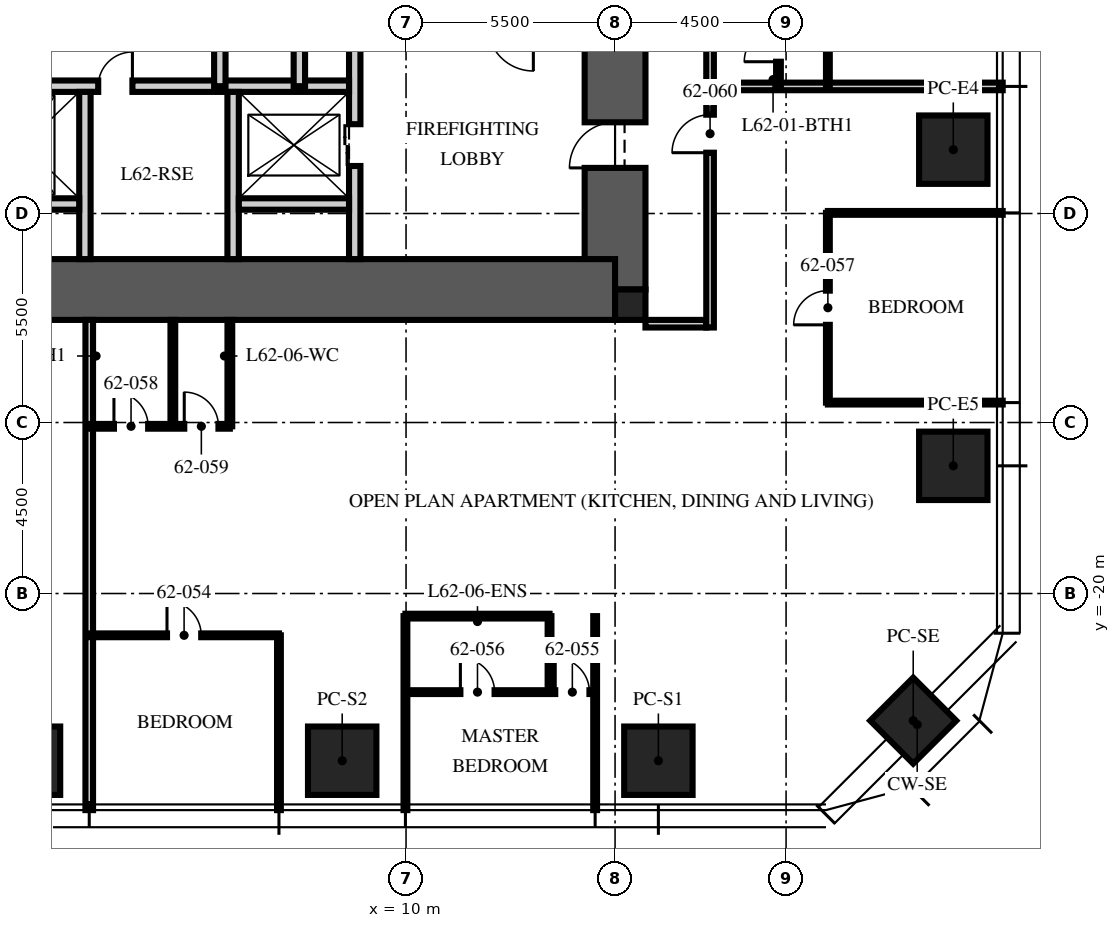
"""IFC4 building model, lengths in metres.
Left out: names, types, materials, properties, quantities, classifications, styles, units other than length and angle.
Written with IfcOpenShell. Run it as: python <this file> out.ifc"""

import sys

from ifc_helpers import new_model, si_unit, direction, frame, frame_2d, origin, origin_2d, place, context, subcontext, project, spatial, rectangle, extrude, element, fill, save


model = new_model("IFC4")
c1 = context("Model", 3, precision=1e-05, world=origin(), true_north=direction((0.0, 1.0)))
c2 = subcontext(c1, "Body", "Model", "MODEL_VIEW")
j1 = project(units=[si_unit("LENGTHUNIT", "METRE"), si_unit("PLANEANGLEUNIT", "RADIAN")], contexts=[c1])
p1 = place(None, origin())
s1 = spatial("IfcSite", under=j1, at=p1, CompositionType="ELEMENT")
p2 = place(p1, origin())
s2 = spatial("IfcBuilding", under=s1, at=p2, CompositionType="ELEMENT")
p3 = place(p2, frame((0.0, 0.0, 248.25)))
s3 = spatial("IfcBuildingStorey", under=s2, at=p3, CompositionType="ELEMENT", Elevation=248.25)
p4 = place(p3, frame((15.5, -12.0, -0.25), z_axis=(0.0, 0.0, 1.0), x_axis=(0.0, 1.0, 0.0)))
e1 = element("IfcWall", 1, at=p4, inside=s3, PredefinedType="SHEAR", context=c2, shape_type="SweptSolid", body=[
    extrude(rectangle(XDim=24.0, YDim=1.6, at=frame_2d((12.0, 0.0))), origin(), (0.0, 0.0, 1.0), 3.75),
])
p5 = place(p4, frame((3.2, 0.0, 0.25)))
e2 = element("IfcOpeningElement", 2, at=p5, cuts=e1, PredefinedType="OPENING", context=c2, shape_type="SweptSolid", body=[
    extrude(rectangle(XDim=1.2, YDim=2.1, at=frame_2d((0.6, 1.05))), frame((0.0, 0.81, 0.0), z_axis=(0.0, -1.0, 0.0), x_axis=(1.0, 0.0, 0.0)), (0.0, 0.0, 1.0), 1.62),
])
p6 = place(p4, frame((19.3, 0.0, 0.25)))
e3 = element("IfcOpeningElement", 3, at=p6, cuts=e1, PredefinedType="OPENING", context=c2, shape_type="SweptSolid", body=[
    extrude(rectangle(XDim=1.8, YDim=2.1, at=frame_2d((0.9, 1.05))), frame((0.0, 0.81, 0.0), z_axis=(0.0, -1.0, 0.0), x_axis=(1.0, 0.0, 0.0)), (0.0, 0.0, 1.0), 1.62),
])
p7 = place(p3, frame((-15.5, -12.0, -0.25), z_axis=(0.0, 0.0, 1.0), x_axis=(1.0, 0.0, 0.0)))
e4 = element("IfcWall", 4, at=p7, inside=s3, PredefinedType="SHEAR", context=c2, shape_type="SweptSolid", body=[
    extrude(rectangle(XDim=31.0, YDim=1.6, at=frame_2d((15.5, 0.0))), origin(), (0.0, 0.0, 1.0), 3.75),
])
p8 = place(p3, frame((15.9, -12.4, -0.25), z_axis=(0.0, 0.0, 1.0), x_axis=(1.0, 0.0, 0.0)))
e5 = element("IfcColumn", 5, at=p8, inside=s3, PredefinedType="COLUMN", context=c2, shape_type="SweptSolid", body=[
    extrude(rectangle(XDim=0.8, YDim=0.8, at=origin_2d()), origin(), (0.0, 0.0, 1.0), 3.75),
])
for number, where, z_axis, x_axis in (
    (6, (24.4, -8.32, 0.0), (0.0, 0.0, 1.0), (0.0, 1.0, 0.0)),
    (7, (24.4, -16.64, 0.0), (0.0, 0.0, 1.0), (0.0, 1.0, 0.0)),
    (8, (16.64, -24.4, 0.0), (0.0, 0.0, 1.0), (1.0, 0.0, 0.0)),
    (9, (8.32, -24.4, 0.0), (0.0, 0.0, 1.0), (1.0, 0.0, 0.0)),
    (10, (0.0, -24.4, 0.0), (0.0, 0.0, 1.0), (1.0, 0.0, 0.0)),
):
    element("IfcColumn", number, at=place(p3, frame(where, z_axis=z_axis, x_axis=x_axis)), inside=s3, PredefinedType="COLUMN", context=c2, shape_type="SweptSolid", body=[
        extrude(rectangle(XDim=1.8, YDim=1.8, at=origin_2d()), origin(), (0.0, 0.0, 1.0), 3.75),
    ])
p9 = place(p3, frame((23.346, -23.346, 0.0), z_axis=(0.0, 0.0, 1.0), x_axis=(0.707106781187, 0.707106781187, 0.0)))
e11 = element("IfcColumn", 11, at=p9, inside=s3, PredefinedType="COLUMN", context=c2, shape_type="SweptSolid", body=[
    extrude(rectangle(XDim=1.6, YDim=1.6, at=origin_2d()), origin(), (0.0, 0.0, 1.0), 3.75),
])
p10 = place(p3, frame((8.65, -11.2, 0.0), z_axis=(0.0, 0.0, 1.0), x_axis=(0.0, 1.0, 0.0)))
e12 = element("IfcWall", 12, at=p10, inside=s3, PredefinedType="PARTITIONING", context=c2, shape_type="SweptSolid", body=[
    extrude(rectangle(XDim=6.3, YDim=0.3, at=frame_2d((3.15, 0.0))), origin(), (0.0, 0.0, 1.0), 3.5),
])
p11 = place(p10, frame((2.45, 0.0, 0.0)))
e13 = element("IfcOpeningElement", 13, at=p11, cuts=e12, PredefinedType="OPENING", context=c2, shape_type="SweptSolid", body=[
    extrude(rectangle(XDim=1.1, YDim=2.1, at=frame_2d((0.55, 1.05))), frame((0.0, 0.16, 0.0), z_axis=(0.0, -1.0, 0.0), x_axis=(1.0, 0.0, 0.0)), (0.0, 0.0, 1.0), 0.32),
])
p12 = place(p3, frame((-8.5, -6.65, 0.0), z_axis=(0.0, 0.0, 1.0), x_axis=(1.0, 0.0, 0.0)))
e14 = element("IfcWall", 14, at=p12, inside=s3, PredefinedType="PARTITIONING", context=c2, shape_type="SweptSolid", body=[
    extrude(rectangle(XDim=17.0, YDim=0.3, at=frame_2d((8.5, 0.0))), origin(), (0.0, 0.0, 1.0), 3.5),
])
p13 = place(p12, frame((7.8, 0.0, 0.0)))
e15 = element("IfcOpeningElement", 15, at=p13, cuts=e14, PredefinedType="OPENING", context=c2, shape_type="SweptSolid", body=[
    extrude(rectangle(XDim=1.3, YDim=2.4, at=frame_2d((0.65, 1.2))), frame((0.0, 0.16, 0.0), z_axis=(0.0, -1.0, 0.0), x_axis=(1.0, 0.0, 0.0)), (0.0, 0.0, 1.0), 0.32),
])
p14 = place(p12, frame((5.65, 0.0, 0.0)))
e16 = element("IfcOpeningElement", 16, at=p14, cuts=e14, PredefinedType="OPENING", context=c2, shape_type="SweptSolid", body=[
    extrude(rectangle(XDim=0.9, YDim=2.1, at=frame_2d((0.45, 1.05))), frame((0.0, 0.16, 0.0), z_axis=(0.0, -1.0, 0.0), x_axis=(1.0, 0.0, 0.0)), (0.0, 0.0, 1.0), 0.32),
])
p15 = place(p12, frame((10.4, 0.0, 0.0)))
e17 = element("IfcOpeningElement", 17, at=p15, cuts=e14, PredefinedType="OPENING", context=c2, shape_type="SweptSolid", body=[
    extrude(rectangle(XDim=0.9, YDim=2.1, at=frame_2d((0.45, 1.05))), frame((0.0, 0.16, 0.0), z_axis=(0.0, -1.0, 0.0), x_axis=(1.0, 0.0, 0.0)), (0.0, 0.0, 1.0), 0.32),
])
for number, where, z_axis, x_axis in (
    (18, (1.55, -11.2, 0.0), (0.0, 0.0, 1.0), (0.0, 1.0, 0.0)),
    (19, (5.45, -11.2, 0.0), (0.0, 0.0, 1.0), (0.0, 1.0, 0.0)),
):
    element("IfcWall", number, at=place(p3, frame(where, z_axis=z_axis, x_axis=x_axis)), inside=s3, PredefinedType="PARTITIONING", context=c2, shape_type="SweptSolid", body=[
        extrude(rectangle(XDim=4.4, YDim=0.3, at=frame_2d((2.2, 0.0))), origin(), (0.0, 0.0, 1.0), 3.5),
    ])
for number, where, z_axis, x_axis in (
    (20, (-1.5, -9.75, 0.0), (0.0, 0.0, 1.0), (1.0, 0.0, 0.0)),
    (21, (5.6, -9.75, 0.0), (0.0, 0.0, 1.0), (1.0, 0.0, 0.0)),
):
    element("IfcWall", number, at=place(p3, frame(where, z_axis=z_axis, x_axis=x_axis)), inside=s3, PredefinedType="PARTITIONING", context=c2, shape_type="SweptSolid", body=[
        extrude(rectangle(XDim=2.9, YDim=0.3, at=frame_2d((1.45, 0.0))), origin(), (0.0, 0.0, 1.0), 3.5),
    ])
p16 = place(p3, frame((5.1, -6.65, 0.0), z_axis=(0.0, 0.0, 1.0), x_axis=(0.0, 1.0, 0.0)))
e22 = element("IfcWall", 22, at=p16, inside=s3, PredefinedType="PARTITIONING", context=c2, shape_type="SweptSolid", body=[
    extrude(rectangle(XDim=9.45, YDim=0.3, at=frame_2d((4.725, 0.0))), origin(), (0.0, 0.0, 1.0), 3.5),
])
p17 = place(p16, frame((4.275, 0.0, 0.0)))
e23 = element("IfcOpeningElement", 23, at=p17, cuts=e22, PredefinedType="OPENING", context=c2, shape_type="SweptSolid", body=[
    extrude(rectangle(XDim=0.9, YDim=2.1, at=frame_2d((0.45, 1.05))), frame((0.0, 0.16, 0.0), z_axis=(0.0, -1.0, 0.0), x_axis=(1.0, 0.0, 0.0)), (0.0, 0.0, 1.0), 0.32),
])
p18 = place(p3, frame((7.193, -6.65, 0.0), z_axis=(0.0, 0.0, 1.0), x_axis=(0.0, 1.0, 0.0)))
e24 = element("IfcWall", 24, at=p18, inside=s3, PredefinedType="PARTITIONING", context=c2, shape_type="SweptSolid", body=[
    extrude(rectangle(XDim=9.45, YDim=0.3, at=frame_2d((4.725, 0.0))), origin(), (0.0, 0.0, 1.0), 3.5),
])
p19 = place(p3, frame((16.3, -12.9, 0.0), z_axis=(0.0, 0.0, 1.0), x_axis=(1.0, 0.0, 0.0)))
e25 = element("IfcWall", 25, at=p19, inside=s3, PredefinedType="PARTITIONING", context=c2, shape_type="SweptSolid", body=[
    extrude(rectangle(XDim=1.6, YDim=0.2, at=frame_2d((0.8, 0.0))), origin(), (0.0, 0.0, 1.0), 2.3),
])
p20 = place(p3, frame((18.1, -6.656, 0.0), z_axis=(0.0, 0.0, 1.0), x_axis=(1.0, 0.0, 0.0)))
e26 = element("IfcWall", 26, at=p20, inside=s3, PredefinedType="PARTITIONING", context=c2, shape_type="SweptSolid", body=[
    extrude(rectangle(XDim=7.6, YDim=0.2, at=frame_2d((3.8, 0.0))), origin(), (0.0, 0.0, 1.0), 2.91),
])
p21 = place(p3, frame((1.664, -12.8, 0.0), z_axis=(0.0, 0.0, 1.0), x_axis=(0.0, -1.0, 0.0)))
e27 = element("IfcWall", 27, at=p21, inside=s3, PredefinedType="PARTITIONING", context=c2, shape_type="SweptSolid", body=[
    extrude(rectangle(XDim=12.9, YDim=0.2, at=frame_2d((6.45, 0.0))), origin(), (0.0, 0.0, 1.0), 2.91),
])
p22 = place(p3, frame((6.656, -21.1, 0.0), z_axis=(0.0, 0.0, 1.0), x_axis=(0.0, -1.0, 0.0)))
e28 = element("IfcWall", 28, at=p22, inside=s3, PredefinedType="PARTITIONING", context=c2, shape_type="SweptSolid", body=[
    extrude(rectangle(XDim=4.6, YDim=0.1, at=frame_2d((2.3, 0.0))), origin(), (0.0, 0.0, 1.0), 2.91),
])
for number, where, z_axis, x_axis in (
    (29, (9.984, -20.595, 0.0), (0.0, 0.0, 1.0), (0.0, -1.0, 0.0)),
    (30, (14.976, -20.595, 0.0), (0.0, 0.0, 1.0), (0.0, -1.0, 0.0)),
):
    element("IfcWall", number, at=place(p3, frame(where, z_axis=z_axis, x_axis=x_axis)), inside=s3, PredefinedType="PARTITIONING", context=c2, shape_type="SweptSolid", body=[
        extrude(rectangle(XDim=5.105, YDim=0.1, at=frame_2d((2.552, 0.0))), origin(), (0.0, 0.0, 1.0), 2.91),
    ])
for number, where, z_axis, x_axis in (
    (31, (21.1, -14.976, 0.0), (0.0, 0.0, 1.0), (1.0, 0.0, 0.0)),
    (32, (21.1, -9.984, 0.0), (0.0, 0.0, 1.0), (1.0, 0.0, 0.0)),
):
    element("IfcWall", number, at=place(p3, frame(where, z_axis=z_axis, x_axis=x_axis)), inside=s3, PredefinedType="PARTITIONING", context=c2, shape_type="SweptSolid", body=[
        extrude(rectangle(XDim=4.6, YDim=0.1, at=frame_2d((2.3, 0.0))), origin(), (0.0, 0.0, 1.0), 2.91),
    ])
p23 = place(p3, frame((21.1, -6.656, 0.0), z_axis=(0.0, 0.0, 1.0), x_axis=(0.0, 1.0, 0.0)))
e33 = element("IfcWall", 33, at=p23, inside=s3, PredefinedType="PARTITIONING", context=c2, shape_type="SweptSolid", body=[
    extrude(rectangle(XDim=4.992, YDim=0.1, at=frame_2d((2.496, 0.0))), origin(), (0.0, 0.0, 1.0), 2.81),
])
p24 = place(p23, frame((2.046, 0.0, 0.0)))
e34 = element("IfcOpeningElement", 34, at=p24, cuts=e33, PredefinedType="OPENING", context=c2, shape_type="SweptSolid", body=[
    extrude(rectangle(XDim=0.9, YDim=2.1, at=frame_2d((0.45, 1.05))), frame((0.0, 0.06, 0.0), z_axis=(0.0, -1.0, 0.0), x_axis=(1.0, 0.0, 0.0)), (0.0, 0.0, 1.0), 0.12),
])
p25 = place(p3, frame((19.8, -6.656, 0.0), z_axis=(0.0, 0.0, 1.0), x_axis=(0.0, 1.0, 0.0)))
e35 = element("IfcWall", 35, at=p25, inside=s3, PredefinedType="PARTITIONING", context=c2, shape_type="SweptSolid", body=[
    extrude(rectangle(XDim=2.2, YDim=0.125, at=frame_2d((1.1, 0.0))), origin(), (0.0, 0.0, 1.0), 3.5),
])
p26 = place(p25, frame((0.65, 0.0, 0.0)))
e36 = element("IfcOpeningElement", 36, at=p26, cuts=e35, PredefinedType="OPENING", context=c2, shape_type="SweptSolid", body=[
    extrude(rectangle(XDim=0.9, YDim=2.1, at=frame_2d((0.45, 1.05))), frame((0.0, 0.073, 0.0), z_axis=(0.0, -1.0, 0.0), x_axis=(1.0, 0.0, 0.0)), (0.0, 0.0, 1.0), 0.145),
])
p27 = place(p3, frame((1.664, -21.1, 0.0), z_axis=(0.0, 0.0, 1.0), x_axis=(1.0, 0.0, 0.0)))
e37 = element("IfcWall", 37, at=p27, inside=s3, PredefinedType="PARTITIONING", context=c2, shape_type="SweptSolid", body=[
    extrude(rectangle(XDim=4.992, YDim=0.1, at=frame_2d((2.496, 0.0))), origin(), (0.0, 0.0, 1.0), 2.81),
])
p28 = place(p27, frame((2.046, 0.0, 0.0)))
e38 = element("IfcOpeningElement", 38, at=p28, cuts=e37, PredefinedType="OPENING", context=c2, shape_type="SweptSolid", body=[
    extrude(rectangle(XDim=0.9, YDim=2.1, at=frame_2d((0.45, 1.05))), frame((0.0, 0.06, 0.0), z_axis=(0.0, -1.0, 0.0), x_axis=(1.0, 0.0, 0.0)), (0.0, 0.0, 1.0), 0.12),
])
p29 = place(p3, frame((9.984, -22.595, 0.0), z_axis=(0.0, 0.0, 1.0), x_axis=(1.0, 0.0, 0.0)))
e39 = element("IfcWall", 39, at=p29, inside=s3, PredefinedType="PARTITIONING", context=c2, shape_type="SweptSolid", body=[
    extrude(rectangle(XDim=4.992, YDim=0.1, at=frame_2d((2.496, 0.0))), origin(), (0.0, 0.0, 1.0), 2.81),
])
p30 = place(p29, frame((3.942, 0.0, 0.0)))
e40 = element("IfcOpeningElement", 40, at=p30, cuts=e39, PredefinedType="OPENING", context=c2, shape_type="SweptSolid", body=[
    extrude(rectangle(XDim=0.9, YDim=2.1, at=frame_2d((0.45, 1.05))), frame((0.0, 0.06, 0.0), z_axis=(0.0, -1.0, 0.0), x_axis=(1.0, 0.0, 0.0)), (0.0, 0.0, 1.0), 0.12),
])
p31 = place(p29, frame((1.446, 0.0, 0.0)))
e41 = element("IfcOpeningElement", 41, at=p31, cuts=e39, PredefinedType="OPENING", context=c2, shape_type="SweptSolid", body=[
    extrude(rectangle(XDim=0.9, YDim=2.1, at=frame_2d((0.45, 1.05))), frame((0.0, 0.06, 0.0), z_axis=(0.0, -1.0, 0.0), x_axis=(1.0, 0.0, 0.0)), (0.0, 0.0, 1.0), 0.12),
])
p32 = place(p3, frame((13.776, -20.595, 0.0), z_axis=(0.0, 0.0, 1.0), x_axis=(0.0, -1.0, 0.0)))
e42 = element("IfcWall", 42, at=p32, inside=s3, PredefinedType="PARTITIONING", context=c2, shape_type="SweptSolid", body=[
    extrude(rectangle(XDim=2.0, YDim=0.1, at=frame_2d((1.0, 0.0))), origin(), (0.0, 0.0, 1.0), 3.5),
])
p33 = place(p3, frame((9.984, -20.595, 0.0), z_axis=(0.0, 0.0, 1.0), x_axis=(1.0, 0.0, 0.0)))
e43 = element("IfcWall", 43, at=p33, inside=s3, PredefinedType="PARTITIONING", context=c2, shape_type="SweptSolid", body=[
    extrude(rectangle(XDim=3.792, YDim=0.125, at=frame_2d((1.896, 0.0))), origin(), (0.0, 0.0, 1.0), 2.81),
])
p34 = place(p3, frame((21.1, -14.976, 0.0), z_axis=(0.0, 0.0, 1.0), x_axis=(0.0, 1.0, 0.0)))
e44 = element("IfcWall", 44, at=p34, inside=s3, PredefinedType="PARTITIONING", context=c2, shape_type="SweptSolid", body=[
    extrude(rectangle(XDim=4.992, YDim=0.1, at=frame_2d((2.496, 0.0))), origin(), (0.0, 0.0, 1.0), 2.81),
])
p35 = place(p34, frame((2.046, 0.0, 0.0)))
e45 = element("IfcOpeningElement", 45, at=p35, cuts=e44, PredefinedType="OPENING", context=c2, shape_type="SweptSolid", body=[
    extrude(rectangle(XDim=0.9, YDim=2.1, at=frame_2d((0.45, 1.05))), frame((0.0, 0.06, 0.0), z_axis=(0.0, -1.0, 0.0), x_axis=(1.0, 0.0, 0.0)), (0.0, 0.0, 1.0), 0.12),
])
p36 = place(p3, frame((1.664, -15.6, 0.0), z_axis=(0.0, 0.0, 1.0), x_axis=(1.0, 0.0, 0.0)))
e46 = element("IfcWall", 46, at=p36, inside=s3, PredefinedType="PARTITIONING", context=c2, shape_type="SweptSolid", body=[
    extrude(rectangle(XDim=3.7, YDim=0.125, at=frame_2d((1.85, 0.0))), origin(), (0.0, 0.0, 1.0), 2.81),
])
p37 = place(p36, frame((0.65, 0.0, 0.0)))
e47 = element("IfcOpeningElement", 47, at=p37, cuts=e46, PredefinedType="OPENING", context=c2, shape_type="SweptSolid", body=[
    extrude(rectangle(XDim=0.9, YDim=2.1, at=frame_2d((0.45, 1.05))), frame((0.0, 0.073, 0.0), z_axis=(0.0, -1.0, 0.0), x_axis=(1.0, 0.0, 0.0)), (0.0, 0.0, 1.0), 0.145),
])
p38 = place(p36, frame((2.5, 0.0, 0.0)))
e48 = element("IfcOpeningElement", 48, at=p38, cuts=e46, PredefinedType="OPENING", context=c2, shape_type="SweptSolid", body=[
    extrude(rectangle(XDim=0.9, YDim=2.1, at=frame_2d((0.45, 1.05))), frame((0.0, 0.073, 0.0), z_axis=(0.0, -1.0, 0.0), x_axis=(1.0, 0.0, 0.0)), (0.0, 0.0, 1.0), 0.145),
])
for number, where, z_axis, x_axis in (
    (49, (3.864, -12.8, 0.0), (0.0, 0.0, 1.0), (0.0, -1.0, 0.0)),
    (50, (5.364, -12.8, 0.0), (0.0, 0.0, 1.0), (0.0, -1.0, 0.0)),
):
    element("IfcWall", number, at=place(p3, frame(where, z_axis=z_axis, x_axis=x_axis)), inside=s3, PredefinedType="PARTITIONING", context=c2, shape_type="SweptSolid", body=[
        extrude(rectangle(XDim=2.8, YDim=0.125, at=frame_2d((1.4, 0.0))), origin(), (0.0, 0.0, 1.0), 3.5),
    ])
p39 = place(p3, frame((18.0, -13.0, 0.0), z_axis=(0.0, 0.0, 1.0), x_axis=(0.0, 1.0, 0.0)))
e51 = element("IfcWall", 51, at=p39, inside=s3, PredefinedType="PARTITIONING", context=c2, shape_type="SweptSolid", body=[
    extrude(rectangle(XDim=26.0, YDim=0.2, at=frame_2d((13.0, 0.0))), origin(), (0.0, 0.0, 1.0), 2.6),
])
p40 = place(p39, frame((21.364, 0.0, 0.0)))
e52 = element("IfcOpeningElement", 52, at=p40, cuts=e51, PredefinedType="OPENING", context=c2, shape_type="SweptSolid", body=[
    extrude(rectangle(XDim=1.0, YDim=2.2, at=frame_2d((0.5, 1.1))), frame((0.0, 0.11, 0.0), z_axis=(0.0, -1.0, 0.0), x_axis=(1.0, 0.0, 0.0)), (0.0, 0.0, 1.0), 0.22),
])
p41 = place(p39, frame((23.754, 0.0, 0.0)))
e53 = element("IfcOpeningElement", 53, at=p41, cuts=e51, PredefinedType="OPENING", context=c2, shape_type="SweptSolid", body=[
    extrude(rectangle(XDim=1.0, YDim=2.2, at=frame_2d((0.5, 1.1))), frame((0.0, 0.11, 0.0), z_axis=(0.0, -1.0, 0.0), x_axis=(1.0, 0.0, 0.0)), (0.0, 0.0, 1.0), 0.22),
])
p42 = place(p39, frame((4.6, 0.0, 0.0)))
e54 = element("IfcOpeningElement", 54, at=p42, cuts=e51, PredefinedType="OPENING", context=c2, shape_type="SweptSolid", body=[
    extrude(rectangle(XDim=1.0, YDim=2.2, at=frame_2d((0.5, 1.1))), frame((0.0, 0.11, 0.0), z_axis=(0.0, -1.0, 0.0), x_axis=(1.0, 0.0, 0.0)), (0.0, 0.0, 1.0), 0.22),
])
p43 = place(p5, origin())
e55 = element("IfcDoor", 55, at=p43, inside=s3, OperationType="SINGLE_SWING_LEFT", PredefinedType="DOOR", context=c2, shape_type="SweptSolid", body=[
    extrude(rectangle(XDim=1.2, YDim=2.1, at=frame_2d((0.6, 1.05))), frame((0.0, 0.025, 0.0), z_axis=(0.0, -1.0, 0.0), x_axis=(1.0, 0.0, 0.0)), (0.0, 0.0, 1.0), 0.05),
])
fill(e2, e55)
p44 = place(p11, origin())
e56 = element("IfcDoor", 56, at=p44, inside=s3, OperationType="DOUBLE_DOOR_SLIDING", PredefinedType="DOOR", context=c2, shape_type="SweptSolid", body=[
    extrude(rectangle(XDim=1.1, YDim=2.1, at=frame_2d((0.55, 1.05))), frame((0.0, 0.025, 0.0), z_axis=(0.0, -1.0, 0.0), x_axis=(1.0, 0.0, 0.0)), (0.0, 0.0, 1.0), 0.05),
])
fill(e13, e56)
p45 = place(p15, origin())
e57 = element("IfcDoor", 57, at=p45, inside=s3, OperationType="SINGLE_SWING_RIGHT", PredefinedType="DOOR", context=c2, shape_type="SweptSolid", body=[
    extrude(rectangle(XDim=0.9, YDim=2.1, at=frame_2d((0.45, 1.05))), frame((0.0, 0.025, 0.0), z_axis=(0.0, -1.0, 0.0), x_axis=(1.0, 0.0, 0.0)), (0.0, 0.0, 1.0), 0.05),
])
fill(e17, e57)
p46 = place(p26, origin())
e58 = element("IfcDoor", 58, at=p46, inside=s3, OperationType="SINGLE_SWING_LEFT", PredefinedType="DOOR", context=c2, shape_type="SweptSolid", body=[
    extrude(rectangle(XDim=0.9, YDim=2.1, at=frame_2d((0.45, 1.05))), frame((0.0, 0.025, 0.0), z_axis=(0.0, -1.0, 0.0), x_axis=(1.0, 0.0, 0.0)), (0.0, 0.0, 1.0), 0.05),
])
fill(e36, e58)
p47 = place(p28, origin())
e59 = element("IfcDoor", 59, at=p47, inside=s3, OperationType="SINGLE_SWING_LEFT", PredefinedType="DOOR", context=c2, shape_type="SweptSolid", body=[
    extrude(rectangle(XDim=0.9, YDim=2.1, at=frame_2d((0.45, 1.05))), frame((0.0, 0.025, 0.0), z_axis=(0.0, -1.0, 0.0), x_axis=(1.0, 0.0, 0.0)), (0.0, 0.0, 1.0), 0.05),
])
fill(e38, e59)
p48 = place(p30, origin())
e60 = element("IfcDoor", 60, at=p48, inside=s3, OperationType="SINGLE_SWING_LEFT", PredefinedType="DOOR", context=c2, shape_type="SweptSolid", body=[
    extrude(rectangle(XDim=0.9, YDim=2.1, at=frame_2d((0.45, 1.05))), frame((0.0, 0.025, 0.0), z_axis=(0.0, -1.0, 0.0), x_axis=(1.0, 0.0, 0.0)), (0.0, 0.0, 1.0), 0.05),
])
fill(e40, e60)
p49 = place(p31, origin())
e61 = element("IfcDoor", 61, at=p49, inside=s3, OperationType="SINGLE_SWING_LEFT", PredefinedType="DOOR", context=c2, shape_type="SweptSolid", body=[
    extrude(rectangle(XDim=0.9, YDim=2.1, at=frame_2d((0.45, 1.05))), frame((0.0, 0.025, 0.0), z_axis=(0.0, -1.0, 0.0), x_axis=(1.0, 0.0, 0.0)), (0.0, 0.0, 1.0), 0.05),
])
fill(e41, e61)
p50 = place(p35, origin())
e62 = element("IfcDoor", 62, at=p50, inside=s3, OperationType="SINGLE_SWING_LEFT", PredefinedType="DOOR", context=c2, shape_type="SweptSolid", body=[
    extrude(rectangle(XDim=0.9, YDim=2.1, at=frame_2d((0.45, 1.05))), frame((0.0, 0.025, 0.0), z_axis=(0.0, -1.0, 0.0), x_axis=(1.0, 0.0, 0.0)), (0.0, 0.0, 1.0), 0.05),
])
fill(e45, e62)
p51 = place(p37, origin())
e63 = element("IfcDoor", 63, at=p51, inside=s3, OperationType="SINGLE_SWING_LEFT", PredefinedType="DOOR", context=c2, shape_type="SweptSolid", body=[
    extrude(rectangle(XDim=0.9, YDim=2.1, at=frame_2d((0.45, 1.05))), frame((0.0, 0.025, 0.0), z_axis=(0.0, -1.0, 0.0), x_axis=(1.0, 0.0, 0.0)), (0.0, 0.0, 1.0), 0.05),
])
fill(e47, e63)
p52 = place(p38, origin())
e64 = element("IfcDoor", 64, at=p52, inside=s3, OperationType="SINGLE_SWING_LEFT", PredefinedType="DOOR", context=c2, shape_type="SweptSolid", body=[
    extrude(rectangle(XDim=0.9, YDim=2.1, at=frame_2d((0.45, 1.05))), frame((0.0, 0.025, 0.0), z_axis=(0.0, -1.0, 0.0), x_axis=(1.0, 0.0, 0.0)), (0.0, 0.0, 1.0), 0.05),
])
fill(e48, e64)
p53 = place(p42, origin())
e65 = element("IfcDoor", 65, at=p53, inside=s3, OperationType="SINGLE_SWING_LEFT", PredefinedType="DOOR", context=c2, shape_type="SweptSolid", body=[
    extrude(rectangle(XDim=1.0, YDim=2.2, at=frame_2d((0.5, 1.1))), frame((0.0, 0.025, 0.0), z_axis=(0.0, -1.0, 0.0), x_axis=(1.0, 0.0, 0.0)), (0.0, 0.0, 1.0), 0.05),
])
fill(e54, e65)
save(model, sys.argv[1])
